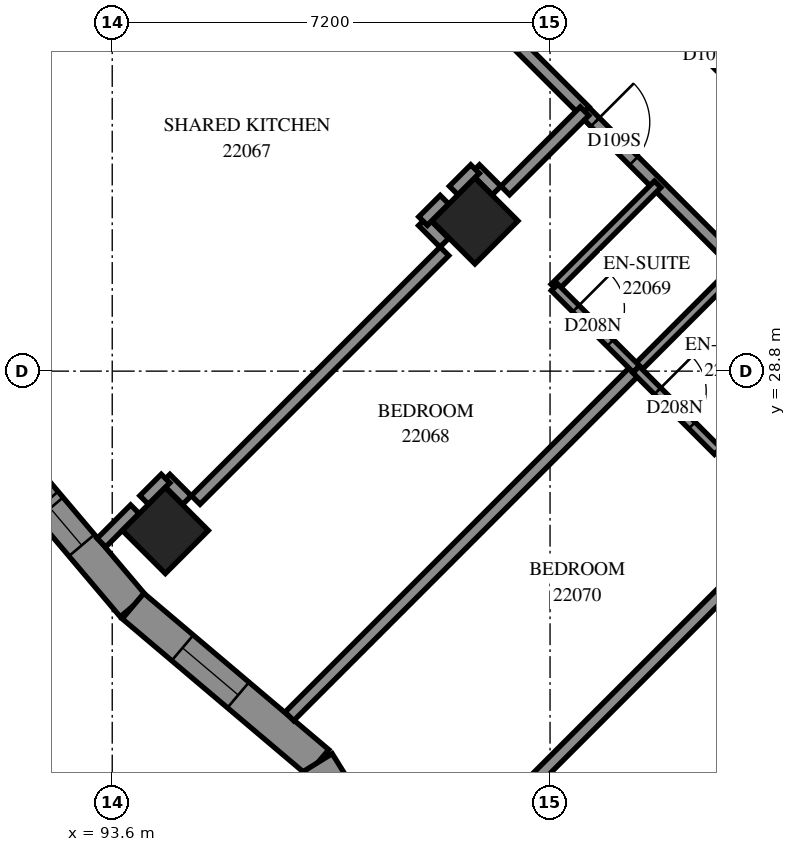
"""IFC4 building model, lengths in metres.
Left out: names, types, materials, properties, quantities, classifications, styles, units other than length and angle.
Written with IfcOpenShell. Run it as: python <this file> out.ifc"""

import sys

from ifc_helpers import new_model, si_unit, direction, frame, frame_2d, origin, origin_2d, place, context, subcontext, project, spatial, polyline, rectangle, outline, extrude, element, fill, save


model = new_model("IFC4")
c1 = context("Model", 3, precision=1e-05, world=origin(), true_north=direction((0.0, 1.0)))
c2 = subcontext(c1, "Body", "Model", "MODEL_VIEW")
j1 = project(units=[si_unit("LENGTHUNIT", "METRE"), si_unit("PLANEANGLEUNIT", "RADIAN")], contexts=[c1])
p1 = place(None, origin())
s1 = spatial("IfcSite", under=j1, at=p1, CompositionType="ELEMENT")
p2 = place(p1, origin())
s2 = spatial("IfcBuilding", under=s1, at=p2, CompositionType="ELEMENT")
p3 = place(p2, frame((0.0, 0.0, 84.6)))
s3 = spatial("IfcBuildingStorey", under=s2, at=p3, CompositionType="ELEMENT", Elevation=84.6)
for number, where, z_axis, x_axis in (
    (1, (99.565, 31.271, 0.0), (0.0, 0.0, 1.0), (0.707, -0.707, 0.0)),
    (2, (94.474, 26.18, 0.0), (0.0, 0.0, 1.0), (0.707, -0.707, 0.0)),
):
    element("IfcColumn", number, at=place(p3, frame(where, z_axis=z_axis, x_axis=x_axis)), inside=s3, PredefinedType="COLUMN", context=c2, shape_type="SweptSolid", body=[
        extrude(rectangle(XDim=1.0, YDim=1.0, at=origin_2d()), origin(), (0.0, 0.0, 1.0), 3.1),
    ])
p4 = place(p3, frame((91.384, 27.963, 0.0), z_axis=(0.0, 0.0, 1.0), x_axis=(0.6457578131, -0.7635423019, 0.0)))
e3 = element("IfcWall", 3, at=p4, inside=s3, PredefinedType="SOLIDWALL", context=c2, shape_type="SweptSolid", body=[
    extrude(outline(polyline([(0.023, -0.275), (3.985, -0.275), (3.939, 0.275), (-0.023, 0.275), (0.023, -0.275)])), origin(), (0.0, 0.0, 1.0), 3.1),
])
p5 = place(p4, frame((0.429, 0.0, 0.5)))
e4 = element("IfcOpeningElement", 4, at=p5, cuts=e3, PredefinedType="OPENING", context=c2, shape_type="SweptSolid", body=[
    extrude(rectangle(XDim=1.3, YDim=2.45, at=frame_2d((0.65, 1.225))), frame((0.0, 0.285, 0.0), z_axis=(0.0, -1.0, 0.0), x_axis=(1.0, 0.0, 0.0)), (0.0, 0.0, 1.0), 0.57),
])
p6 = place(p4, frame((1.855, 0.0, 0.45)))
e5 = element("IfcOpeningElement", 5, at=p6, cuts=e3, PredefinedType="OPENING", context=c2, shape_type="SweptSolid", body=[
    extrude(rectangle(XDim=0.8, YDim=2.5, at=frame_2d((0.4, 1.25))), frame((0.0, 0.285, 0.0), z_axis=(0.0, -1.0, 0.0), x_axis=(1.0, 0.0, 0.0)), (0.0, 0.0, 1.0), 0.57),
])
p7 = place(p3, frame((93.942, 24.937, 0.0), z_axis=(0.0, 0.0, 1.0), x_axis=(0.7635272124, -0.6457756545, 0.0)))
e6 = element("IfcWall", 6, at=p7, inside=s3, PredefinedType="SOLIDWALL", context=c2, shape_type="SweptSolid", body=[
    extrude(outline(polyline([(-0.023, -0.275), (3.939, -0.275), (4.027, 0.275), (0.023, 0.275), (-0.023, -0.275)])), origin(), (0.0, 0.0, 1.0), 3.1),
])
p8 = place(p7, frame((1.065, 0.0, 0.5)))
e7 = element("IfcOpeningElement", 7, at=p8, cuts=e6, PredefinedType="OPENING", context=c2, shape_type="SweptSolid", body=[
    extrude(rectangle(XDim=1.2, YDim=2.45, at=frame_2d((0.6, 1.225))), frame((0.0, 0.285, 0.0), z_axis=(0.0, -1.0, 0.0), x_axis=(1.0, 0.0, 0.0)), (0.0, 0.0, 1.0), 0.57),
])
p9 = place(p3, frame((96.984, 22.365, 0.0), z_axis=(0.0, 0.0, 1.0), x_axis=(0.5261788565, -0.8503739242, 0.0)))
e8 = element("IfcWall", 8, at=p9, inside=s3, PredefinedType="SOLIDWALL", context=c2, shape_type="SweptSolid", body=[
    extrude(outline(polyline([(0.044, -0.275), (4.1, -0.275), (3.657, 0.275), (-0.044, 0.275), (0.044, -0.275)])), origin(), (0.0, 0.0, 1.0), 3.1),
])
p10 = place(p9, frame((0.901, 0.0, 0.5)))
e9 = element("IfcOpeningElement", 9, at=p10, cuts=e8, PredefinedType="OPENING", context=c2, shape_type="SweptSolid", body=[
    extrude(rectangle(XDim=1.2, YDim=2.45, at=frame_2d((0.6, 1.225))), frame((0.0, 0.285, 0.0), z_axis=(0.0, -1.0, 0.0), x_axis=(1.0, 0.0, 0.0)), (0.0, 0.0, 1.0), 0.57),
])
p11 = place(p3, frame((96.513, 23.123, 0.0), z_axis=(0.0, 0.0, 1.0), x_axis=(0.7069766463, 0.7072368922, 0.0)))
e10 = element("IfcWall", 10, at=p11, inside=s3, PredefinedType="PARTITIONING", context=c2, shape_type="SweptSolid", body=[
    extrude(rectangle(XDim=8.069, YDim=0.2, at=frame_2d((4.035, 0.0))), origin(), (0.0, 0.0, 1.0), 3.1),
])
p12 = place(p3, frame((101.365, 33.071, 0.0), z_axis=(0.0, 0.0, 1.0), x_axis=(0.7071067812, -0.7071067812, 0.0)))
e11 = element("IfcWall", 11, at=p12, inside=s3, PredefinedType="PARTITIONING", context=c2, shape_type="SweptSolid", body=[
    extrude(rectangle(XDim=7.2, YDim=0.2, at=frame_2d((3.6, 0.0))), origin(), (0.0, 0.0, 1.0), 3.1),
])
p13 = place(p12, frame((0.248, 0.0, 0.0)))
e12 = element("IfcOpeningElement", 12, at=p13, cuts=e11, PredefinedType="OPENING", context=c2, shape_type="SweptSolid", body=[
    extrude(rectangle(XDim=0.9, YDim=2.1, at=frame_2d((0.45, 1.05))), frame((0.0, 0.11, 0.0), z_axis=(0.0, -1.0, 0.0), x_axis=(1.0, 0.0, 0.0)), (0.0, 0.0, 1.0), 0.22),
])
p14 = place(p12, frame((5.95, 0.0, 0.0)))
e13 = element("IfcOpeningElement", 13, at=p14, cuts=e11, PredefinedType="OPENING", context=c2, shape_type="SweptSolid", body=[
    extrude(rectangle(XDim=0.9, YDim=2.1, at=frame_2d((0.45, 1.05))), frame((0.0, 0.11, 0.0), z_axis=(0.0, -1.0, 0.0), x_axis=(1.0, 0.0, 0.0)), (0.0, 0.0, 1.0), 0.22),
])
p15 = place(p3, frame((89.881, 31.771, 0.0), z_axis=(0.0, 0.0, 1.0), x_axis=(0.7071067812, 0.7071067812, 0.0)))
e14 = element("IfcWall", 14, at=p15, inside=s3, PredefinedType="PARTITIONING", context=c2, shape_type="SweptSolid", body=[
    extrude(rectangle(XDim=5.787, YDim=0.2, at=frame_2d((2.893, 0.0))), origin(), (0.0, 0.0, 1.0), 3.1),
])
p16 = place(p3, frame((100.063, 21.589, 0.0), z_axis=(0.0, 0.0, 1.0), x_axis=(0.7071067812, 0.7071067812, 0.0)))
e15 = element("IfcWall", 15, at=p16, inside=s3, PredefinedType="PARTITIONING", context=c2, shape_type="SweptSolid", body=[
    extrude(rectangle(XDim=5.787, YDim=0.2, at=frame_2d((2.893, 0.0))), origin(), (0.0, 0.0, 1.0), 2.6),
])
p17 = place(p3, frame((94.973, 26.681, 0.0), z_axis=(0.0, 0.0, 1.0), x_axis=(0.7071067812, 0.7071067812, 0.0)))
e16 = element("IfcWall", 16, at=p17, inside=s3, PredefinedType="PARTITIONING", context=c2, shape_type="SweptSolid", body=[
    extrude(rectangle(XDim=5.784, YDim=0.2, at=frame_2d((2.892, 0.0))), origin(), (0.0, 0.0, 1.0), 3.1),
])
p18 = place(p3, frame((98.469, 35.973, 0.0), z_axis=(0.0, 0.0, 1.0), x_axis=(0.7073506531, -0.7068628251, 0.0)))
e17 = element("IfcWall", 17, at=p18, inside=s3, PredefinedType="PARTITIONING", context=c2, shape_type="SweptSolid", body=[
    extrude(rectangle(XDim=4.1, YDim=0.2, at=frame_2d((2.05, 0.0))), origin(), (0.0, 0.0, 1.0), 3.1),
])
p19 = place(p18, frame((0.457, 0.0, 0.0)))
e18 = element("IfcOpeningElement", 18, at=p19, cuts=e17, PredefinedType="OPENING", context=c2, shape_type="SweptSolid", body=[
    extrude(rectangle(XDim=1.0, YDim=2.1, at=frame_2d((0.5, 1.05))), frame((0.0, 0.11, 0.0), z_axis=(0.0, -1.0, 0.0), x_axis=(1.0, 0.0, 0.0)), (0.0, 0.0, 1.0), 0.22),
])
p20 = place(p3, frame((100.871, 30.175, 0.0), z_axis=(0.0, 0.0, 1.0), x_axis=(0.7071067812, 0.7071067812, 0.0)))
e19 = element("IfcWall", 19, at=p20, inside=s3, PredefinedType="PARTITIONING", context=c2, shape_type="SweptSolid", body=[
    extrude(rectangle(XDim=2.401, YDim=0.15, at=frame_2d((1.201, 0.0))), origin(), (0.0, 0.0, 1.0), 3.1),
])
for number, where, z_axis, x_axis in (
    (20, (102.216, 28.832, 0.0), (0.0, 0.0, 1.0), (0.707, 0.707, 0.0)),
    (21, (103.559, 27.489, 0.0), (0.0, 0.0, 1.0), (0.707, 0.707, 0.0)),
):
    element("IfcWall", number, at=place(p3, frame(where, z_axis=z_axis, x_axis=x_axis)), inside=s3, PredefinedType="PARTITIONING", context=c2, shape_type="SweptSolid", body=[
        extrude(rectangle(XDim=2.398, YDim=0.15, at=frame_2d((1.199, 0.0))), origin(), (0.0, 0.0, 1.0), 3.1),
    ])
p21 = place(p3, frame((100.875, 30.177, 0.0), z_axis=(0.0, 0.0, 1.0), x_axis=(0.7076330979, -0.7065800724, 0.0)))
e22 = element("IfcWall", 22, at=p21, inside=s3, PredefinedType="PARTITIONING", context=c2, shape_type="SweptSolid", body=[
    extrude(rectangle(XDim=1.899, YDim=0.15, at=frame_2d((0.95, 0.0))), origin(), (0.0, 0.0, 1.0), 3.1),
])
p22 = place(p21, frame((0.493, 0.0, 0.0)))
e23 = element("IfcOpeningElement", 23, at=p22, cuts=e22, PredefinedType="OPENING", context=c2, shape_type="SweptSolid", body=[
    extrude(rectangle(XDim=0.8, YDim=2.1, at=frame_2d((0.4, 1.05))), frame((0.0, 0.085, 0.0), z_axis=(0.0, -1.0, 0.0), x_axis=(1.0, 0.0, 0.0)), (0.0, 0.0, 1.0), 0.17),
])
p23 = place(p3, frame((102.215, 28.826, 0.0), z_axis=(0.0, 0.0, 1.0), x_axis=(0.7071067812, -0.7071067812, 0.0)))
e24 = element("IfcWall", 24, at=p23, inside=s3, PredefinedType="PARTITIONING", context=c2, shape_type="SweptSolid", body=[
    extrude(rectangle(XDim=1.898, YDim=0.15, at=frame_2d((0.949, 0.0))), origin(), (0.0, 0.0, 1.0), 3.1),
])
p24 = place(p23, frame((0.5, 0.0, 0.0)))
e25 = element("IfcOpeningElement", 25, at=p24, cuts=e24, PredefinedType="OPENING", context=c2, shape_type="SweptSolid", body=[
    extrude(rectangle(XDim=0.8, YDim=2.1, at=frame_2d((0.4, 1.05))), frame((0.0, 0.085, 0.0), z_axis=(0.0, -1.0, 0.0), x_axis=(1.0, 0.0, 0.0)), (0.0, 0.0, 1.0), 0.17),
])
p25 = place(p3, frame((100.063, 31.771, 0.0), z_axis=(0.0, 0.0, 1.0), x_axis=(0.7071067812, 0.7071067812, 0.0)))
e26 = element("IfcWall", 26, at=p25, inside=s3, PredefinedType="PARTITIONING", context=c2, shape_type="SweptSolid", body=[
    extrude(rectangle(XDim=1.844, YDim=0.2, at=frame_2d((0.922, 0.0))), origin(), (0.0, 0.0, 1.0), 3.1),
])
p26 = place(p3, frame((102.857, 34.563, 0.0), z_axis=(0.0, 0.0, 1.0), x_axis=(0.7071067812, -0.7071067812, 0.0)))
e27 = element("IfcWall", 27, at=p26, inside=s3, PredefinedType="PARTITIONING", context=c2, shape_type="SweptSolid", body=[
    extrude(rectangle(XDim=1.7, YDim=0.2, at=frame_2d((0.85, 0.0))), origin(), (0.0, 0.0, 1.0), 3.1),
])
p27 = place(p26, frame((0.35, 0.0, 0.0)))
e28 = element("IfcOpeningElement", 28, at=p27, cuts=e27, PredefinedType="OPENING", context=c2, shape_type="SweptSolid", body=[
    extrude(rectangle(XDim=0.9, YDim=2.1, at=frame_2d((0.45, 1.05))), frame((0.0, 0.11, 0.0), z_axis=(0.0, -1.0, 0.0), x_axis=(1.0, 0.0, 0.0)), (0.0, 0.0, 1.0), 0.22),
])
p28 = place(p3, frame((93.422, 25.978, 0.0), z_axis=(0.0, 0.0, 1.0), x_axis=(0.707042595, 0.7071709615, 0.0)))
e29 = element("IfcWall", 29, at=p28, inside=s3, PredefinedType="PARTITIONING", context=c2, shape_type="SweptSolid", body=[
    extrude(rectangle(XDim=0.779, YDim=0.2, at=frame_2d((0.39, 0.0))), origin(), (0.0, 0.0, 1.0), 3.1),
])
p29 = place(p3, frame((98.709, 31.265, 0.0), z_axis=(0.0, 0.0, 1.0), x_axis=(0.7051008166, -0.7091070712, 0.0)))
e30 = element("IfcWall", 30, at=p29, inside=s3, PredefinedType="PARTITIONING", context=c2, shape_type="SweptSolid", body=[
    extrude(rectangle(XDim=0.499, YDim=0.2, at=frame_2d((0.25, 0.0))), origin(), (0.0, 0.0, 1.0), 3.1),
])
for number, where, z_axis, x_axis in (
    (31, (99.569, 32.123, 0.0), (0.0, 0.0, 1.0), (0.707, -0.707, 0.0)),
    (32, (94.478, 27.032, 0.0), (0.0, 0.0, 1.0), (0.707, -0.707, 0.0)),
    (33, (94.125, 26.681, 0.0), (0.0, 0.0, 1.0), (0.707, 0.707, 0.0)),
    (34, (99.215, 31.771, 0.0), (0.0, 0.0, 1.0), (0.707, 0.707, 0.0)),
    (35, (98.712, 31.268, 0.0), (0.0, 0.0, 1.0), (0.707, 0.707, 0.0)),
):
    element("IfcWall", number, at=place(p3, frame(where, z_axis=z_axis, x_axis=x_axis)), inside=s3, PredefinedType="PARTITIONING", context=c2, shape_type="SweptSolid", body=[
        extrude(rectangle(XDim=0.498, YDim=0.2, at=frame_2d((0.249, 0.0))), origin(), (0.0, 0.0, 1.0), 3.1),
    ])
p30 = place(p5, origin())
e36 = element("IfcWindow", 36, at=p30, inside=s3, PartitioningType="SINGLE_PANEL", PredefinedType="WINDOW", context=c2, shape_type="SweptSolid", body=[
    extrude(rectangle(XDim=1.3, YDim=2.45, at=frame_2d((0.65, 1.225))), frame((0.0, 0.155, 0.0), z_axis=(0.0, -1.0, 0.0), x_axis=(1.0, 0.0, 0.0)), (0.0, 0.0, 1.0), 0.06),
])
fill(e4, e36)
p31 = place(p8, origin())
e37 = element("IfcWindow", 37, at=p31, inside=s3, PartitioningType="SINGLE_PANEL", PredefinedType="WINDOW", context=c2, shape_type="SweptSolid", body=[
    extrude(rectangle(XDim=1.2, YDim=2.45, at=frame_2d((0.6, 1.225))), frame((0.0, 0.155, 0.0), z_axis=(0.0, -1.0, 0.0), x_axis=(1.0, 0.0, 0.0)), (0.0, 0.0, 1.0), 0.06),
])
fill(e7, e37)
p32 = place(p27, origin())
e38 = element("IfcDoor", 38, at=p32, inside=s3, OperationType="SINGLE_SWING_LEFT", PredefinedType="DOOR", context=c2, shape_type="SweptSolid", body=[
    extrude(rectangle(XDim=0.9, YDim=2.1, at=frame_2d((0.45, 1.05))), frame((0.0, 0.025, 0.0), z_axis=(0.0, -1.0, 0.0), x_axis=(1.0, 0.0, 0.0)), (0.0, 0.0, 1.0), 0.05),
])
fill(e28, e38)
p33 = place(p13, origin())
e39 = element("IfcDoor", 39, at=p33, inside=s3, OperationType="SINGLE_SWING_RIGHT", PredefinedType="DOOR", context=c2, shape_type="SweptSolid", body=[
    extrude(rectangle(XDim=0.9, YDim=2.1, at=frame_2d((0.45, 1.05))), frame((0.0, 0.025, 0.0), z_axis=(0.0, -1.0, 0.0), x_axis=(1.0, 0.0, 0.0)), (0.0, 0.0, 1.0), 0.05),
])
fill(e12, e39)
p34 = place(p22, origin())
e40 = element("IfcDoor", 40, at=p34, inside=s3, OperationType="SINGLE_SWING_RIGHT", PredefinedType="DOOR", context=c2, shape_type="SweptSolid", body=[
    extrude(rectangle(XDim=0.8, YDim=2.1, at=frame_2d((0.4, 1.05))), frame((0.0, 0.025, 0.0), z_axis=(0.0, -1.0, 0.0), x_axis=(1.0, 0.0, 0.0)), (0.0, 0.0, 1.0), 0.05),
])
fill(e23, e40)
p35 = place(p24, origin())
e41 = element("IfcDoor", 41, at=p35, inside=s3, OperationType="SINGLE_SWING_RIGHT", PredefinedType="DOOR", context=c2, shape_type="SweptSolid", body=[
    extrude(rectangle(XDim=0.8, YDim=2.1, at=frame_2d((0.4, 1.05))), frame((0.0, 0.025, 0.0), z_axis=(0.0, -1.0, 0.0), x_axis=(1.0, 0.0, 0.0)), (0.0, 0.0, 1.0), 0.05),
])
fill(e25, e41)
p36 = place(p6, origin())
e42 = element("IfcWindow", 42, at=p36, inside=s3, PartitioningType="SINGLE_PANEL", PredefinedType="WINDOW", context=c2, shape_type="SweptSolid", body=[
    extrude(rectangle(XDim=0.8, YDim=2.5, at=frame_2d((0.4, 1.25))), frame((0.0, 0.155, 0.0), z_axis=(0.0, -1.0, 0.0), x_axis=(1.0, 0.0, 0.0)), (0.0, 0.0, 1.0), 0.06),
])
fill(e5, e42)
save(model, sys.argv[1])
